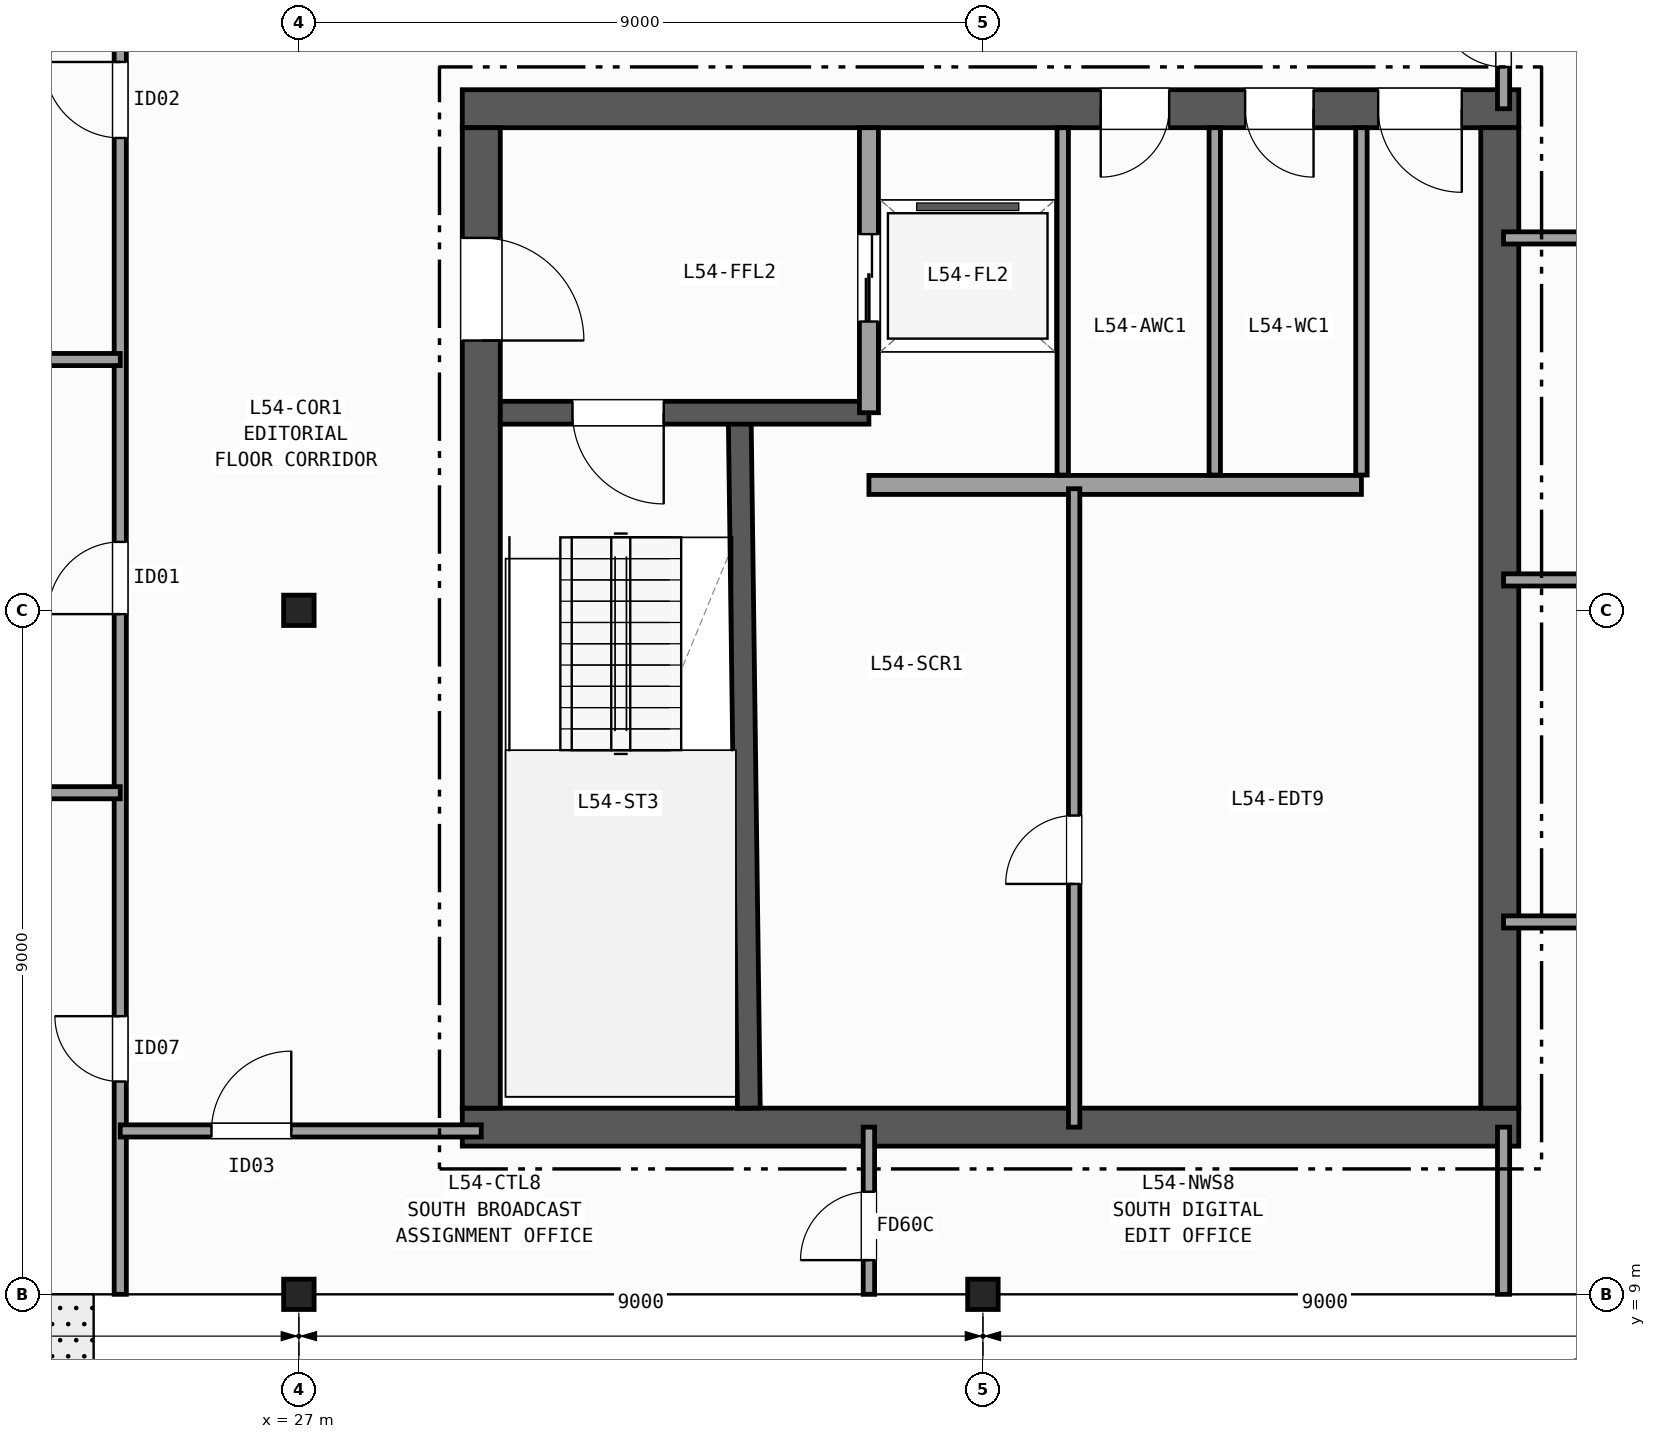
"""IFC4 building model, lengths in metres.
Left out: names, types, materials, properties, quantities, classifications, styles, units other than length and angle.
Written with IfcOpenShell. Run it as: python <this file> out.ifc"""

import sys

from ifc_helpers import new_model, si_unit, direction, frame, frame_2d, origin, origin_2d, place, context, subcontext, project, spatial, rectangle, i_section, extrude, element, fill, save


model = new_model("IFC4")
c1 = context("Model", 3, precision=1e-05, world=origin(), true_north=direction((0.0, 1.0)))
c2 = subcontext(c1, "Body", "Model", "MODEL_VIEW")
j1 = project(units=[si_unit("LENGTHUNIT", "METRE"), si_unit("PLANEANGLEUNIT", "RADIAN")], contexts=[c1])
p1 = place(None, origin())
s1 = spatial("IfcSite", under=j1, at=p1, CompositionType="ELEMENT")
p2 = place(p1, origin())
s2 = spatial("IfcBuilding", under=s1, at=p2, CompositionType="ELEMENT")
p3 = place(p2, frame((0.0, 0.0, 217.3)))
s3 = spatial("IfcBuildingStorey", under=s2, at=p3, CompositionType="ELEMENT", Elevation=217.3)
for number, where, z_axis, x_axis in (
    (1, (27.0, 9.0, 0.0), (0.0, 0.0, 1.0), (1.0, 0.0, 0.0)),
    (2, (27.0, 18.0, 0.0), (0.0, 0.0, 1.0), (1.0, 0.0, 0.0)),
    (3, (36.0, 9.0, 0.0), (0.0, 0.0, 1.0), (1.0, 0.0, 0.0)),
):
    element("IfcColumn", number, at=place(p3, frame(where, z_axis=z_axis, x_axis=x_axis)), inside=s3, PredefinedType="COLUMN", context=c2, shape_type="SweptSolid", body=[
        extrude(i_section(OverallWidth=0.401, OverallDepth=0.399, WebThickness=0.025, FlangeThickness=0.04, FilletRadius=0.015, at=origin_2d()), origin(), (0.0, 0.0, 1.0), 3.7),
    ])
p4 = place(p3, frame((29.15, 11.2, 0.0), z_axis=(0.0, 0.0, 1.0), x_axis=(1.0, 0.0, 0.0)))
e4 = element("IfcWall", 4, at=p4, inside=s3, PredefinedType="SHEAR", context=c2, shape_type="SweptSolid", body=[
    extrude(rectangle(XDim=13.9, YDim=0.5, at=frame_2d((6.95, 0.0))), origin(), (0.0, 0.0, 1.0), 3.42),
])
p5 = place(p3, frame((43.05, 24.6, 0.0), z_axis=(0.0, 0.0, 1.0), x_axis=(-1.0, 0.0, 0.0)))
e5 = element("IfcWall", 5, at=p5, inside=s3, PredefinedType="SHEAR", context=c2, shape_type="SweptSolid", body=[
    extrude(rectangle(XDim=13.9, YDim=0.5, at=frame_2d((6.95, 0.0))), origin(), (0.0, 0.0, 1.0), 3.42),
])
p6 = place(p5, frame((0.75, 0.0, 0.0)))
e6 = element("IfcOpeningElement", 6, at=p6, cuts=e5, PredefinedType="OPENING", context=c2, shape_type="SweptSolid", body=[
    extrude(rectangle(XDim=1.1, YDim=2.15, at=frame_2d((0.55, 1.075))), frame((0.0, 0.26, 0.0), z_axis=(0.0, -1.0, 0.0), x_axis=(1.0, 0.0, 0.0)), (0.0, 0.0, 1.0), 0.52),
])
p7 = place(p5, frame((2.7, 0.0, 0.0)))
e7 = element("IfcOpeningElement", 7, at=p7, cuts=e5, PredefinedType="OPENING", context=c2, shape_type="SweptSolid", body=[
    extrude(rectangle(XDim=0.9, YDim=2.1, at=frame_2d((0.45, 1.05))), frame((0.0, 0.26, 0.0), z_axis=(0.0, -1.0, 0.0), x_axis=(1.0, 0.0, 0.0)), (0.0, 0.0, 1.0), 0.52),
])
p8 = place(p5, frame((4.6, 0.0, 0.0)))
e8 = element("IfcOpeningElement", 8, at=p8, cuts=e5, PredefinedType="OPENING", context=c2, shape_type="SweptSolid", body=[
    extrude(rectangle(XDim=0.9, YDim=2.1, at=frame_2d((0.45, 1.05))), frame((0.0, 0.26, 0.0), z_axis=(0.0, -1.0, 0.0), x_axis=(1.0, 0.0, 0.0)), (0.0, 0.0, 1.0), 0.52),
])
p9 = place(p3, frame((29.4, 24.35, 0.0), z_axis=(0.0, 0.0, 1.0), x_axis=(0.0, -1.0, 0.0)))
e9 = element("IfcWall", 9, at=p9, inside=s3, PredefinedType="SHEAR", context=c2, shape_type="SweptSolid", body=[
    extrude(rectangle(XDim=12.9, YDim=0.5, at=frame_2d((6.45, 0.0))), origin(), (0.0, 0.0, 1.0), 3.42),
])
p10 = place(p9, frame((1.45, 0.0, 0.0)))
e10 = element("IfcOpeningElement", 10, at=p10, cuts=e9, PredefinedType="OPENING", context=c2, shape_type="SweptSolid", body=[
    extrude(rectangle(XDim=1.35, YDim=2.15, at=frame_2d((0.675, 1.075))), frame((0.0, 0.26, 0.0), z_axis=(0.0, -1.0, 0.0), x_axis=(1.0, 0.0, 0.0)), (0.0, 0.0, 1.0), 0.52),
])
p11 = place(p3, frame((42.8, 11.45, 0.0), z_axis=(0.0, 0.0, 1.0), x_axis=(0.0, 1.0, 0.0)))
e11 = element("IfcWall", 11, at=p11, inside=s3, PredefinedType="SHEAR", context=c2, shape_type="SweptSolid", body=[
    extrude(rectangle(XDim=12.9, YDim=0.5, at=frame_2d((6.45, 0.0))), origin(), (0.0, 0.0, 1.0), 3.42),
])
p12 = place(p3, frame((32.92, 11.45, 0.0), z_axis=(0.0, 0.0, 1.0), x_axis=(-0.013171578211, 0.999913251001, 0.0)))
e12 = element("IfcWall", 12, at=p12, inside=s3, PredefinedType="SHEAR", context=c2, shape_type="SweptSolid", body=[
    extrude(rectangle(XDim=9.101, YDim=0.3, at=frame_2d((4.55, 0.0))), origin(), (0.0, 0.0, 1.0), 3.42),
])
p13 = place(p3, frame((34.5, 20.6, 0.0), z_axis=(0.0, 0.0, 1.0), x_axis=(-1.0, 0.0, 0.0)))
e13 = element("IfcWall", 13, at=p13, inside=s3, PredefinedType="SHEAR", context=c2, shape_type="SweptSolid", body=[
    extrude(rectangle(XDim=4.85, YDim=0.3, at=frame_2d((2.425, 0.0))), origin(), (0.0, 0.0, 1.0), 3.42),
])
p14 = place(p13, frame((2.7, 0.0, 0.0)))
e14 = element("IfcOpeningElement", 14, at=p14, cuts=e13, PredefinedType="OPENING", context=c2, shape_type="SweptSolid", body=[
    extrude(rectangle(XDim=1.2, YDim=2.15, at=frame_2d((0.6, 1.075))), frame((0.0, 0.16, 0.0), z_axis=(0.0, -1.0, 0.0), x_axis=(1.0, 0.0, 0.0)), (0.0, 0.0, 1.0), 0.32),
])
p15 = place(p3, frame((34.5, 20.6, 0.0), z_axis=(0.0, 0.0, 1.0), x_axis=(0.0, 1.0, 0.0)))
e15 = element("IfcWall", 15, at=p15, inside=s3, PredefinedType="PARTITIONING", context=c2, shape_type="SweptSolid", body=[
    extrude(rectangle(XDim=3.75, YDim=0.25, at=frame_2d((1.875, 0.0))), origin(), (0.0, 0.0, 1.0), 3.42),
])
p16 = place(p15, frame((1.2, 0.0, 0.0)))
e16 = element("IfcOpeningElement", 16, at=p16, cuts=e15, PredefinedType="OPENING", context=c2, shape_type="SweptSolid", body=[
    extrude(rectangle(XDim=1.15, YDim=2.15, at=frame_2d((0.575, 1.075))), frame((0.0, 0.135, 0.0), z_axis=(0.0, -1.0, 0.0), x_axis=(1.0, 0.0, 0.0)), (0.0, 0.0, 1.0), 0.27),
])
p17 = place(p3, frame((34.5, 19.65, 0.0), z_axis=(0.0, 0.0, 1.0), x_axis=(1.0, 0.0, 0.0)))
e17 = element("IfcWall", 17, at=p17, inside=s3, PredefinedType="PARTITIONING", context=c2, shape_type="SweptSolid", body=[
    extrude(rectangle(XDim=6.48, YDim=0.25, at=frame_2d((3.24, 0.0))), origin(), (0.0, 0.0, 1.0), 3.42),
])
p18 = place(p3, frame((37.2, 11.2, 0.0), z_axis=(0.0, 0.0, 1.0), x_axis=(0.0, 1.0, 0.0)))
e18 = element("IfcWall", 18, at=p18, inside=s3, PredefinedType="PARTITIONING", context=c2, shape_type="SweptSolid", body=[
    extrude(rectangle(XDim=8.4, YDim=0.15, at=frame_2d((4.2, 0.0))), origin(), (0.0, 0.0, 1.0), 3.42),
])
p19 = place(p18, frame((3.2, 0.0, 0.0)))
e19 = element("IfcOpeningElement", 19, at=p19, cuts=e18, PredefinedType="OPENING", context=c2, shape_type="SweptSolid", body=[
    extrude(rectangle(XDim=0.9, YDim=2.1, at=frame_2d((0.45, 1.05))), frame((0.0, 0.085, 0.0), z_axis=(0.0, -1.0, 0.0), x_axis=(1.0, 0.0, 0.0)), (0.0, 0.0, 1.0), 0.17),
])
for number, where, z_axis, x_axis in (
    (20, (37.05, 19.78, 0.0), (0.0, 0.0, 1.0), (0.0, 1.0, 0.0)),
    (21, (39.05, 19.78, 0.0), (0.0, 0.0, 1.0), (0.0, 1.0, 0.0)),
    (22, (40.98, 19.78, 0.0), (0.0, 0.0, 1.0), (0.0, 1.0, 0.0)),
):
    element("IfcWall", number, at=place(p3, frame(where, z_axis=z_axis, x_axis=x_axis)), inside=s3, PredefinedType="PARTITIONING", context=c2, shape_type="SweptSolid", body=[
        extrude(rectangle(XDim=4.57, YDim=0.15, at=frame_2d((2.285, 0.0))), origin(), (0.0, 0.0, 1.0), 3.42),
    ])
p20 = place(p3, frame((24.65, 9.0, 0.0), z_axis=(0.0, 0.0, 1.0), x_axis=(0.0, 1.0, 0.0)))
e23 = element("IfcWall", 23, at=p20, inside=s3, PredefinedType="PARTITIONING", context=c2, shape_type="SweptSolid", body=[
    extrude(rectangle(XDim=19.2, YDim=0.16, at=frame_2d((9.6, 0.0))), origin(), (0.0, 0.0, 1.0), 2.707),
])
p21 = place(p20, frame((2.8, 0.0, 0.0)))
e24 = element("IfcOpeningElement", 24, at=p21, cuts=e23, PredefinedType="OPENING", context=c2, shape_type="SweptSolid", body=[
    extrude(rectangle(XDim=0.86, YDim=2.05, at=frame_2d((0.43, 1.025))), frame((0.0, 0.09, 0.0), z_axis=(0.0, -1.0, 0.0), x_axis=(1.0, 0.0, 0.0)), (0.0, 0.0, 1.0), 0.18),
])
p22 = place(p20, frame((8.95, 0.0, 0.0)))
e25 = element("IfcOpeningElement", 25, at=p22, cuts=e23, PredefinedType="OPENING", context=c2, shape_type="SweptSolid", body=[
    extrude(rectangle(XDim=0.95, YDim=2.1, at=frame_2d((0.475, 1.05))), frame((0.0, 0.09, 0.0), z_axis=(0.0, -1.0, 0.0), x_axis=(1.0, 0.0, 0.0)), (0.0, 0.0, 1.0), 0.18),
])
p23 = place(p20, frame((15.215, 0.0, 0.0)))
e26 = element("IfcOpeningElement", 26, at=p23, cuts=e23, PredefinedType="OPENING", context=c2, shape_type="SweptSolid", body=[
    extrude(rectangle(XDim=1.0, YDim=2.1, at=frame_2d((0.5, 1.05))), frame((0.0, 0.09, 0.0), z_axis=(0.0, -1.0, 0.0), x_axis=(1.0, 0.0, 0.0)), (0.0, 0.0, 1.0), 0.18),
])
p24 = place(p3, frame((18.0, 15.6, 0.0), z_axis=(0.0, 0.0, 1.0), x_axis=(1.0, 0.0, 0.0)))
e27 = element("IfcWall", 27, at=p24, inside=s3, PredefinedType="PARTITIONING", context=c2, shape_type="SweptSolid", body=[
    extrude(rectangle(XDim=6.65, YDim=0.16, at=frame_2d((3.325, 0.0))), origin(), (0.0, 0.0, 1.0), 2.789),
])
p25 = place(p3, frame((18.0, 21.3, 0.0), z_axis=(0.0, 0.0, 1.0), x_axis=(1.0, 0.0, 0.0)))
e28 = element("IfcWall", 28, at=p25, inside=s3, PredefinedType="PARTITIONING", context=c2, shape_type="SweptSolid", body=[
    extrude(rectangle(XDim=6.65, YDim=0.16, at=frame_2d((3.325, 0.0))), origin(), (0.0, 0.0, 1.0), 2.792),
])
p26 = place(p3, frame((24.65, 11.15, 0.0), z_axis=(0.0, 0.0, 1.0), x_axis=(1.0, 0.0, 0.0)))
e29 = element("IfcWall", 29, at=p26, inside=s3, PredefinedType="PARTITIONING", context=c2, shape_type="SweptSolid", body=[
    extrude(rectangle(XDim=4.75, YDim=0.16, at=frame_2d((2.375, 0.0))), origin(), (0.0, 0.0, 1.0), 2.792),
])
p27 = place(p26, frame((1.2, 0.0, 0.0)))
e30 = element("IfcOpeningElement", 30, at=p27, cuts=e29, PredefinedType="OPENING", context=c2, shape_type="SweptSolid", body=[
    extrude(rectangle(XDim=1.05, YDim=2.15, at=frame_2d((0.525, 1.075))), frame((0.0, 0.09, 0.0), z_axis=(0.0, -1.0, 0.0), x_axis=(1.0, 0.0, 0.0)), (0.0, 0.0, 1.0), 0.18),
])
p28 = place(p3, frame((34.5, 9.0, 0.0), z_axis=(0.0, 0.0, 1.0), x_axis=(0.0, 1.0, 0.0)))
e31 = element("IfcWall", 31, at=p28, inside=s3, PredefinedType="PARTITIONING", context=c2, shape_type="SweptSolid", body=[
    extrude(rectangle(XDim=2.2, YDim=0.15, at=frame_2d((1.1, 0.0))), origin(), (0.0, 0.0, 1.0), 2.707),
])
p29 = place(p28, frame((0.45, 0.0, 0.0)))
e32 = element("IfcOpeningElement", 32, at=p29, cuts=e31, PredefinedType="OPENING", context=c2, shape_type="SweptSolid", body=[
    extrude(rectangle(XDim=0.9, YDim=2.1, at=frame_2d((0.45, 1.05))), frame((0.0, 0.085, 0.0), z_axis=(0.0, -1.0, 0.0), x_axis=(1.0, 0.0, 0.0)), (0.0, 0.0, 1.0), 0.17),
])
p30 = place(p3, frame((42.85, 9.0, 0.0), z_axis=(0.0, 0.0, 1.0), x_axis=(0.0, 1.0, 0.0)))
e33 = element("IfcWall", 33, at=p30, inside=s3, PredefinedType="PARTITIONING", context=c2, shape_type="SweptSolid", body=[
    extrude(rectangle(XDim=2.2, YDim=0.16, at=frame_2d((1.1, 0.0))), origin(), (0.0, 0.0, 1.0), 2.707),
])
p31 = place(p3, frame((42.85, 24.6, 0.0), z_axis=(0.0, 0.0, 1.0), x_axis=(0.0, 1.0, 0.0)))
e34 = element("IfcWall", 34, at=p31, inside=s3, PredefinedType="PARTITIONING", context=c2, shape_type="SweptSolid", body=[
    extrude(rectangle(XDim=2.4, YDim=0.16, at=frame_2d((1.2, 0.0))), origin(), (0.0, 0.0, 1.0), 2.707),
])
p32 = place(p31, frame((0.55, 0.0, 0.0)))
e35 = element("IfcOpeningElement", 35, at=p32, cuts=e34, PredefinedType="OPENING", context=c2, shape_type="SweptSolid", body=[
    extrude(rectangle(XDim=0.86, YDim=2.05, at=frame_2d((0.43, 1.025))), frame((0.0, 0.09, 0.0), z_axis=(0.0, -1.0, 0.0), x_axis=(1.0, 0.0, 0.0)), (0.0, 0.0, 1.0), 0.18),
])
p33 = place(p3, frame((42.85, 13.9, 0.0), z_axis=(0.0, 0.0, 1.0), x_axis=(1.0, 0.0, 0.0)))
e36 = element("IfcWall", 36, at=p33, inside=s3, PredefinedType="PARTITIONING", context=c2, shape_type="SweptSolid", body=[
    extrude(rectangle(XDim=11.865, YDim=0.16, at=frame_2d((5.933, 0.0))), origin(), (0.0, 0.0, 1.0), 3.42),
])
p34 = place(p33, frame((4.6, 0.0, 0.0)))
e37 = element("IfcOpeningElement", 37, at=p34, cuts=e36, PredefinedType="OPENING", context=c2, shape_type="SweptSolid", body=[
    extrude(rectangle(XDim=0.95, YDim=2.1, at=frame_2d((0.475, 1.05))), frame((0.0, 0.09, 0.0), z_axis=(0.0, -1.0, 0.0), x_axis=(1.0, 0.0, 0.0)), (0.0, 0.0, 1.0), 0.18),
])
p35 = place(p3, frame((42.85, 18.4, 0.0), z_axis=(0.0, 0.0, 1.0), x_axis=(1.0, 0.0, 0.0)))
e38 = element("IfcWall", 38, at=p35, inside=s3, PredefinedType="PARTITIONING", context=c2, shape_type="SweptSolid", body=[
    extrude(rectangle(XDim=11.15, YDim=0.16, at=frame_2d((5.575, 0.0))), origin(), (0.0, 0.0, 1.0), 3.42),
])
p36 = place(p35, frame((4.6, 0.0, 0.0)))
e39 = element("IfcOpeningElement", 39, at=p36, cuts=e38, PredefinedType="OPENING", context=c2, shape_type="SweptSolid", body=[
    extrude(rectangle(XDim=1.0, YDim=2.1, at=frame_2d((0.5, 1.05))), frame((0.0, 0.09, 0.0), z_axis=(0.0, -1.0, 0.0), x_axis=(1.0, 0.0, 0.0)), (0.0, 0.0, 1.0), 0.18),
])
p37 = place(p3, frame((42.85, 22.9, 0.0), z_axis=(0.0, 0.0, 1.0), x_axis=(1.0, 0.0, 0.0)))
e40 = element("IfcWall", 40, at=p37, inside=s3, PredefinedType="PARTITIONING", context=c2, shape_type="SweptSolid", body=[
    extrude(rectangle(XDim=11.653, YDim=0.16, at=frame_2d((5.826, 0.0))), origin(), (0.0, 0.0, 1.0), 3.42),
])
p38 = place(p37, frame((4.6, 0.0, 0.0)))
e41 = element("IfcOpeningElement", 41, at=p38, cuts=e40, PredefinedType="OPENING", context=c2, shape_type="SweptSolid", body=[
    extrude(rectangle(XDim=1.05, YDim=2.15, at=frame_2d((0.525, 1.075))), frame((0.0, 0.09, 0.0), z_axis=(0.0, -1.0, 0.0), x_axis=(1.0, 0.0, 0.0)), (0.0, 0.0, 1.0), 0.18),
])
p39 = place(p14, origin())
e42 = element("IfcDoor", 42, at=p39, inside=s3, OperationType="SINGLE_SWING_LEFT", PredefinedType="DOOR", context=c2, shape_type="SweptSolid", body=[
    extrude(rectangle(XDim=1.2, YDim=2.15, at=frame_2d((0.6, 1.075))), frame((0.0, 0.025, 0.0), z_axis=(0.0, -1.0, 0.0), x_axis=(1.0, 0.0, 0.0)), (0.0, 0.0, 1.0), 0.05),
])
fill(e14, e42)
p40 = place(p10, origin())
e43 = element("IfcDoor", 43, at=p40, inside=s3, OperationType="SINGLE_SWING_RIGHT", PredefinedType="DOOR", context=c2, shape_type="SweptSolid", body=[
    extrude(rectangle(XDim=1.35, YDim=2.15, at=frame_2d((0.675, 1.075))), frame((0.0, 0.025, 0.0), z_axis=(0.0, -1.0, 0.0), x_axis=(1.0, 0.0, 0.0)), (0.0, 0.0, 1.0), 0.05),
])
fill(e10, e43)
p41 = place(p6, origin())
e44 = element("IfcDoor", 44, at=p41, inside=s3, OperationType="SINGLE_SWING_LEFT", PredefinedType="DOOR", context=c2, shape_type="SweptSolid", body=[
    extrude(rectangle(XDim=1.1, YDim=2.15, at=frame_2d((0.55, 1.075))), frame((0.0, 0.025, 0.0), z_axis=(0.0, -1.0, 0.0), x_axis=(1.0, 0.0, 0.0)), (0.0, 0.0, 1.0), 0.05),
])
fill(e6, e44)
p42 = place(p7, origin())
e45 = element("IfcDoor", 45, at=p42, inside=s3, OperationType="SINGLE_SWING_LEFT", PredefinedType="DOOR", context=c2, shape_type="SweptSolid", body=[
    extrude(rectangle(XDim=0.9, YDim=2.1, at=frame_2d((0.45, 1.05))), frame((0.0, 0.025, 0.0), z_axis=(0.0, -1.0, 0.0), x_axis=(1.0, 0.0, 0.0)), (0.0, 0.0, 1.0), 0.05),
])
fill(e7, e45)
p43 = place(p8, origin())
e46 = element("IfcDoor", 46, at=p43, inside=s3, OperationType="SINGLE_SWING_RIGHT", PredefinedType="DOOR", context=c2, shape_type="SweptSolid", body=[
    extrude(rectangle(XDim=0.9, YDim=2.1, at=frame_2d((0.45, 1.05))), frame((0.0, 0.025, 0.0), z_axis=(0.0, -1.0, 0.0), x_axis=(1.0, 0.0, 0.0)), (0.0, 0.0, 1.0), 0.05),
])
fill(e8, e46)
p44 = place(p16, origin())
e47 = element("IfcDoor", 47, at=p44, inside=s3, OperationType="DOUBLE_DOOR_SLIDING", PredefinedType="DOOR", context=c2, shape_type="SweptSolid", body=[
    extrude(rectangle(XDim=1.15, YDim=2.15, at=frame_2d((0.575, 1.075))), frame((0.0, 0.025, 0.0), z_axis=(0.0, -1.0, 0.0), x_axis=(1.0, 0.0, 0.0)), (0.0, 0.0, 1.0), 0.05),
])
fill(e16, e47)
p45 = place(p19, origin())
e48 = element("IfcDoor", 48, at=p45, inside=s3, OperationType="SINGLE_SWING_LEFT", PredefinedType="DOOR", context=c2, shape_type="SweptSolid", body=[
    extrude(rectangle(XDim=0.9, YDim=2.1, at=frame_2d((0.45, 1.05))), frame((0.0, 0.025, 0.0), z_axis=(0.0, -1.0, 0.0), x_axis=(1.0, 0.0, 0.0)), (0.0, 0.0, 1.0), 0.05),
])
fill(e19, e48)
p46 = place(p21, origin())
e49 = element("IfcDoor", 49, at=p46, inside=s3, OperationType="SINGLE_SWING_RIGHT", PredefinedType="DOOR", context=c2, shape_type="SweptSolid", body=[
    extrude(rectangle(XDim=0.86, YDim=2.05, at=frame_2d((0.43, 1.025))), frame((0.0, 0.025, 0.0), z_axis=(0.0, -1.0, 0.0), x_axis=(1.0, 0.0, 0.0)), (0.0, 0.0, 1.0), 0.05),
])
fill(e24, e49)
p47 = place(p22, origin())
e50 = element("IfcDoor", 50, at=p47, inside=s3, OperationType="SINGLE_SWING_LEFT", PredefinedType="DOOR", context=c2, shape_type="SweptSolid", body=[
    extrude(rectangle(XDim=0.95, YDim=2.1, at=frame_2d((0.475, 1.05))), frame((0.0, 0.025, 0.0), z_axis=(0.0, -1.0, 0.0), x_axis=(1.0, 0.0, 0.0)), (0.0, 0.0, 1.0), 0.05),
])
fill(e25, e50)
p48 = place(p23, origin())
e51 = element("IfcDoor", 51, at=p48, inside=s3, OperationType="SINGLE_SWING_RIGHT", PredefinedType="DOOR", context=c2, shape_type="SweptSolid", body=[
    extrude(rectangle(XDim=1.0, YDim=2.1, at=frame_2d((0.5, 1.05))), frame((0.0, 0.025, 0.0), z_axis=(0.0, -1.0, 0.0), x_axis=(1.0, 0.0, 0.0)), (0.0, 0.0, 1.0), 0.05),
])
fill(e26, e51)
p49 = place(p27, origin())
e52 = element("IfcDoor", 52, at=p49, inside=s3, OperationType="SINGLE_SWING_RIGHT", PredefinedType="DOOR", context=c2, shape_type="SweptSolid", body=[
    extrude(rectangle(XDim=1.05, YDim=2.15, at=frame_2d((0.525, 1.075))), frame((0.0, 0.025, 0.0), z_axis=(0.0, -1.0, 0.0), x_axis=(1.0, 0.0, 0.0)), (0.0, 0.0, 1.0), 0.05),
])
fill(e30, e52)
p50 = place(p29, origin())
e53 = element("IfcDoor", 53, at=p50, inside=s3, OperationType="SINGLE_SWING_LEFT", PredefinedType="DOOR", context=c2, shape_type="SweptSolid", body=[
    extrude(rectangle(XDim=0.9, YDim=2.1, at=frame_2d((0.45, 1.05))), frame((0.0, 0.025, 0.0), z_axis=(0.0, -1.0, 0.0), x_axis=(1.0, 0.0, 0.0)), (0.0, 0.0, 1.0), 0.05),
])
fill(e32, e53)
p51 = place(p32, origin())
e54 = element("IfcDoor", 54, at=p51, inside=s3, OperationType="SINGLE_SWING_RIGHT", PredefinedType="DOOR", context=c2, shape_type="SweptSolid", body=[
    extrude(rectangle(XDim=0.86, YDim=2.05, at=frame_2d((0.43, 1.025))), frame((0.0, 0.025, 0.0), z_axis=(0.0, -1.0, 0.0), x_axis=(1.0, 0.0, 0.0)), (0.0, 0.0, 1.0), 0.05),
])
fill(e35, e54)
save(model, sys.argv[1])
